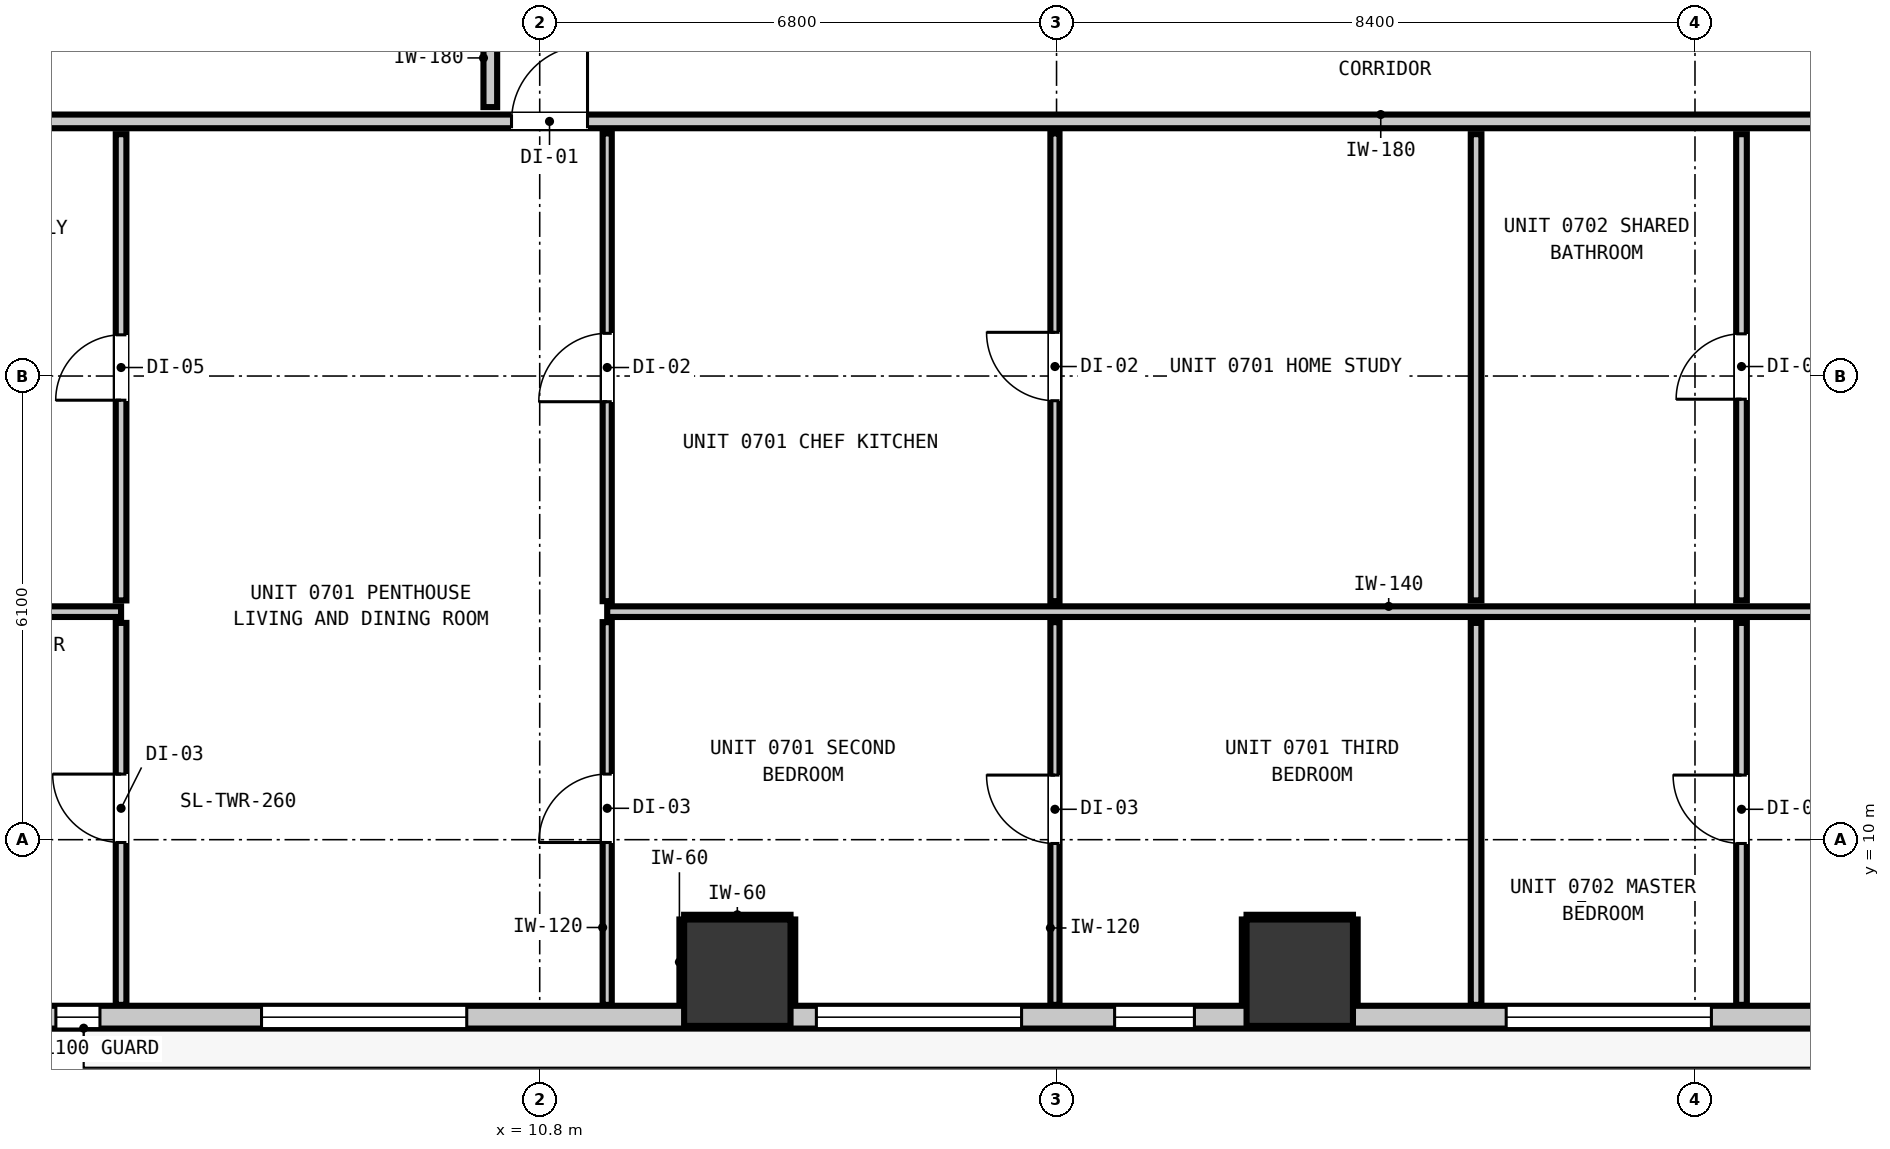
"""IFC4 building model, lengths in metres.
Left out: names, types, materials, properties, quantities, classifications, styles, units other than length and angle.
Written with IfcOpenShell. Run it as: python <this file> out.ifc"""

import sys

from ifc_helpers import new_model, si_unit, direction, frame, frame_2d, origin, origin_2d, place, context, subcontext, project, spatial, rectangle, extrude, element, fill, save


model = new_model("IFC4")
c1 = context("Model", 3, precision=1e-05, world=origin(), true_north=direction((0.0, 1.0)))
c2 = subcontext(c1, "Body", "Model", "MODEL_VIEW")
j1 = project(units=[si_unit("LENGTHUNIT", "METRE"), si_unit("PLANEANGLEUNIT", "RADIAN")], contexts=[c1])
p1 = place(None, origin())
s1 = spatial("IfcSite", under=j1, at=p1, CompositionType="ELEMENT")
p2 = place(p1, origin())
s2 = spatial("IfcBuilding", under=s1, at=p2, CompositionType="ELEMENT")
p3 = place(p2, frame((0.0, 0.0, 28.64)))
s3 = spatial("IfcBuildingStorey", under=s2, at=p3, CompositionType="ELEMENT", Elevation=28.64)
for number, where, z_axis, x_axis in (
    (1, (13.4, 8.25, 0.0), (0.0, 0.0, 1.0), (1.0, 0.0, 0.0)),
    (2, (20.8, 8.25, 0.0), (0.0, 0.0, 1.0), (1.0, 0.0, 0.0)),
):
    element("IfcColumn", number, at=place(p3, frame(where, z_axis=z_axis, x_axis=x_axis)), inside=s3, PredefinedType="COLUMN", context=c2, shape_type="SweptSolid", body=[
        extrude(rectangle(XDim=1.4, YDim=1.4, at=origin_2d()), origin(), (0.0, 0.0, 1.0), 3.32),
    ])
p4 = place(p3, frame((41.635, 7.665, 0.0), z_axis=(0.0, 0.0, 1.0), x_axis=(-1.0, 0.0, 0.0)))
e3 = element("IfcWall", 3, at=p4, inside=s3, PredefinedType="STANDARD", context=c2, shape_type="SweptSolid", body=[
    extrude(rectangle(XDim=37.47, YDim=0.3, at=frame_2d((18.735, 0.0))), origin(), (0.0, 0.0, 1.0), 3.06),
])
p5 = place(p4, frame((0.901, 0.0, 0.0)))
e4 = element("IfcOpeningElement", 4, at=p5, cuts=e3, PredefinedType="OPENING", context=c2, shape_type="SweptSolid", body=[
    extrude(rectangle(XDim=1.0, YDim=2.15, at=frame_2d((0.5, 1.075))), frame((0.0, 0.16, 0.0), z_axis=(0.0, -1.0, 0.0), x_axis=(1.0, 0.0, 0.0)), (0.0, 0.0, 1.0), 0.32),
])
p6 = place(p4, frame((31.795, 0.0, 0.85)))
e5 = element("IfcOpeningElement", 5, at=p6, cuts=e3, PredefinedType="OPENING", context=c2, shape_type="SweptSolid", body=[
    extrude(rectangle(XDim=2.7, YDim=2.0, at=frame_2d((1.35, 1.0))), frame((0.0, 0.16, 0.0), z_axis=(0.0, -1.0, 0.0), x_axis=(1.0, 0.0, 0.0)), (0.0, 0.0, 1.0), 0.32),
])
p7 = place(p4, frame((36.621, 0.0, 0.85)))
e6 = element("IfcOpeningElement", 6, at=p7, cuts=e3, PredefinedType="OPENING", context=c2, shape_type="SweptSolid", body=[
    extrude(rectangle(XDim=0.58, YDim=1.5, at=frame_2d((0.29, 0.75))), frame((0.0, 0.16, 0.0), z_axis=(0.0, -1.0, 0.0), x_axis=(1.0, 0.0, 0.0)), (0.0, 0.0, 1.0), 0.32),
])
p8 = place(p4, frame((24.495, 0.0, 0.85)))
e7 = element("IfcOpeningElement", 7, at=p8, cuts=e3, PredefinedType="OPENING", context=c2, shape_type="SweptSolid", body=[
    extrude(rectangle(XDim=2.7, YDim=2.0, at=frame_2d((1.35, 1.0))), frame((0.0, 0.16, 0.0), z_axis=(0.0, -1.0, 0.0), x_axis=(1.0, 0.0, 0.0)), (0.0, 0.0, 1.0), 0.32),
])
p9 = place(p4, frame((22.221, 0.0, 0.85)))
e8 = element("IfcOpeningElement", 8, at=p9, cuts=e3, PredefinedType="OPENING", context=c2, shape_type="SweptSolid", body=[
    extrude(rectangle(XDim=1.05, YDim=1.65, at=frame_2d((0.525, 0.825))), frame((0.0, 0.16, 0.0), z_axis=(0.0, -1.0, 0.0), x_axis=(1.0, 0.0, 0.0)), (0.0, 0.0, 1.0), 0.32),
])
p10 = place(p4, frame((7.435, 0.0, 0.85)))
e9 = element("IfcOpeningElement", 9, at=p10, cuts=e3, PredefinedType="OPENING", context=c2, shape_type="SweptSolid", body=[
    extrude(rectangle(XDim=2.7, YDim=2.0, at=frame_2d((1.35, 1.0))), frame((0.0, 0.16, 0.0), z_axis=(0.0, -1.0, 0.0), x_axis=(1.0, 0.0, 0.0)), (0.0, 0.0, 1.0), 0.32),
])
p11 = place(p4, frame((15.419, 0.0, 0.85)))
e10 = element("IfcOpeningElement", 10, at=p11, cuts=e3, PredefinedType="OPENING", context=c2, shape_type="SweptSolid", body=[
    extrude(rectangle(XDim=2.7, YDim=2.0, at=frame_2d((1.35, 1.0))), frame((0.0, 0.16, 0.0), z_axis=(0.0, -1.0, 0.0), x_axis=(1.0, 0.0, 0.0)), (0.0, 0.0, 1.0), 0.32),
])
p12 = place(p3, frame((1.827, 19.45, 0.0), z_axis=(0.0, 0.0, 1.0), x_axis=(1.0, 0.0, 0.0)))
e11 = element("IfcWall", 11, at=p12, inside=s3, PredefinedType="PARTITIONING", context=c2, shape_type="SweptSolid", body=[
    extrude(rectangle(XDim=42.146, YDim=0.18, at=frame_2d((21.073, 0.0))), origin(), (0.0, 0.0, 1.0), 3.06),
])
p13 = place(p12, frame((8.602, 0.0, 0.0)))
e12 = element("IfcOpeningElement", 12, at=p13, cuts=e11, PredefinedType="OPENING", context=c2, shape_type="SweptSolid", body=[
    extrude(rectangle(XDim=1.0, YDim=2.15, at=frame_2d((0.5, 1.075))), frame((0.0, 0.1, 0.0), z_axis=(0.0, -1.0, 0.0), x_axis=(1.0, 0.0, 0.0)), (0.0, 0.0, 1.0), 0.2),
])
p14 = place(p12, frame((30.475, 0.0, 0.0)))
e13 = element("IfcOpeningElement", 13, at=p14, cuts=e11, PredefinedType="OPENING", context=c2, shape_type="SweptSolid", body=[
    extrude(rectangle(XDim=1.0, YDim=2.15, at=frame_2d((0.5, 1.075))), frame((0.0, 0.1, 0.0), z_axis=(0.0, -1.0, 0.0), x_axis=(1.0, 0.0, 0.0)), (0.0, 0.0, 1.0), 0.2),
])
p15 = place(p3, frame((1.827, 13.0, 0.0), z_axis=(0.0, 0.0, 1.0), x_axis=(1.0, 0.0, 0.0)))
e14 = element("IfcWall", 14, at=p15, inside=s3, PredefinedType="PARTITIONING", context=c2, shape_type="SweptSolid", body=[
    extrude(rectangle(XDim=3.465, YDim=0.14, at=frame_2d((1.732, 0.0))), origin(), (0.0, 0.0, 1.0), 3.06),
])
p16 = place(p3, frame((11.688, 13.0, 0.0), z_axis=(0.0, 0.0, 1.0), x_axis=(1.0, 0.0, 0.0)))
e15 = element("IfcWall", 15, at=p16, inside=s3, PredefinedType="PARTITIONING", context=c2, shape_type="SweptSolid", body=[
    extrude(rectangle(XDim=32.285, YDim=0.14, at=frame_2d((16.143, 0.0))), origin(), (0.0, 0.0, 1.0), 3.06),
])
p17 = place(p16, frame((20.664, 0.0, 0.0)))
e16 = element("IfcOpeningElement", 16, at=p17, cuts=e15, PredefinedType="OPENING", context=c2, shape_type="SweptSolid", body=[
    extrude(rectangle(XDim=0.9, YDim=2.1, at=frame_2d((0.45, 1.05))), frame((0.0, 0.08, 0.0), z_axis=(0.0, -1.0, 0.0), x_axis=(1.0, 0.0, 0.0)), (0.0, 0.0, 1.0), 0.16),
])
p18 = place(p3, frame((10.15, 19.638, 0.0), z_axis=(0.0, 0.0, 1.0), x_axis=(0.0, 1.0, 0.0)))
e17 = element("IfcWall", 17, at=p18, inside=s3, PredefinedType="PARTITIONING", context=c2, shape_type="SweptSolid", body=[
    extrude(rectangle(XDim=1.294, YDim=0.18, at=frame_2d((0.647, 0.0))), origin(), (0.0, 0.0, 1.0), 3.06),
])
p19 = place(p3, frame((5.292, 7.827, 0.0), z_axis=(0.0, 0.0, 1.0), x_axis=(0.0, 1.0, 0.0)))
e18 = element("IfcWall", 18, at=p19, inside=s3, PredefinedType="PARTITIONING", context=c2, shape_type="SweptSolid", body=[
    extrude(rectangle(XDim=5.025, YDim=0.14, at=frame_2d((2.513, 0.0))), origin(), (0.0, 0.0, 1.0), 3.06),
])
p20 = place(p19, frame((2.136, 0.0, 0.0)))
e19 = element("IfcOpeningElement", 19, at=p20, cuts=e18, PredefinedType="OPENING", context=c2, shape_type="SweptSolid", body=[
    extrude(rectangle(XDim=0.9, YDim=2.1, at=frame_2d((0.45, 1.05))), frame((0.0, 0.08, 0.0), z_axis=(0.0, -1.0, 0.0), x_axis=(1.0, 0.0, 0.0)), (0.0, 0.0, 1.0), 0.16),
])
p21 = place(p3, frame((5.292, 13.148, 0.0), z_axis=(0.0, 0.0, 1.0), x_axis=(0.0, 1.0, 0.0)))
e20 = element("IfcWall", 20, at=p21, inside=s3, PredefinedType="PARTITIONING", context=c2, shape_type="SweptSolid", body=[
    extrude(rectangle(XDim=6.134, YDim=0.14, at=frame_2d((3.067, 0.0))), origin(), (0.0, 0.0, 1.0), 3.06),
])
p22 = place(p21, frame((2.634, 0.0, 0.0)))
e21 = element("IfcOpeningElement", 21, at=p22, cuts=e20, PredefinedType="OPENING", context=c2, shape_type="SweptSolid", body=[
    extrude(rectangle(XDim=0.86, YDim=2.02, at=frame_2d((0.43, 1.01))), frame((0.0, 0.08, 0.0), z_axis=(0.0, -1.0, 0.0), x_axis=(1.0, 0.0, 0.0)), (0.0, 0.0, 1.0), 0.16),
])
p23 = place(p3, frame((23.12, 7.827, 0.0), z_axis=(0.0, 0.0, 1.0), x_axis=(0.0, 1.0, 0.0)))
e22 = element("IfcWall", 22, at=p23, inside=s3, PredefinedType="PARTITIONING", context=c2, shape_type="SweptSolid", body=[
    extrude(rectangle(XDim=5.025, YDim=0.14, at=frame_2d((2.513, 0.0))), origin(), (0.0, 0.0, 1.0), 3.06),
])
p24 = place(p3, frame((23.12, 13.148, 0.0), z_axis=(0.0, 0.0, 1.0), x_axis=(0.0, 1.0, 0.0)))
e23 = element("IfcWall", 23, at=p24, inside=s3, PredefinedType="PARTITIONING", context=c2, shape_type="SweptSolid", body=[
    extrude(rectangle(XDim=6.134, YDim=0.14, at=frame_2d((3.067, 0.0))), origin(), (0.0, 0.0, 1.0), 3.06),
])
p25 = place(p3, frame((26.612, 7.827, 0.0), z_axis=(0.0, 0.0, 1.0), x_axis=(0.0, 1.0, 0.0)))
e24 = element("IfcWall", 24, at=p25, inside=s3, PredefinedType="PARTITIONING", context=c2, shape_type="SweptSolid", body=[
    extrude(rectangle(XDim=5.025, YDim=0.14, at=frame_2d((2.513, 0.0))), origin(), (0.0, 0.0, 1.0), 3.06),
])
p26 = place(p25, frame((2.123, 0.0, 0.0)))
e25 = element("IfcOpeningElement", 25, at=p26, cuts=e24, PredefinedType="OPENING", context=c2, shape_type="SweptSolid", body=[
    extrude(rectangle(XDim=0.9, YDim=2.1, at=frame_2d((0.45, 1.05))), frame((0.0, 0.08, 0.0), z_axis=(0.0, -1.0, 0.0), x_axis=(1.0, 0.0, 0.0)), (0.0, 0.0, 1.0), 0.16),
])
p27 = place(p3, frame((26.612, 13.148, 0.0), z_axis=(0.0, 0.0, 1.0), x_axis=(0.0, 1.0, 0.0)))
e26 = element("IfcWall", 26, at=p27, inside=s3, PredefinedType="PARTITIONING", context=c2, shape_type="SweptSolid", body=[
    extrude(rectangle(XDim=6.134, YDim=0.14, at=frame_2d((3.067, 0.0))), origin(), (0.0, 0.0, 1.0), 3.06),
])
p28 = place(p27, frame((2.647, 0.0, 0.0)))
e27 = element("IfcOpeningElement", 27, at=p28, cuts=e26, PredefinedType="OPENING", context=c2, shape_type="SweptSolid", body=[
    extrude(rectangle(XDim=0.86, YDim=2.02, at=frame_2d((0.43, 1.01))), frame((0.0, 0.08, 0.0), z_axis=(0.0, -1.0, 0.0), x_axis=(1.0, 0.0, 0.0)), (0.0, 0.0, 1.0), 0.16),
])
p29 = place(p3, frame((11.688, 7.827, 0.0), z_axis=(0.0, 0.0, 1.0), x_axis=(0.0, 1.0, 0.0)))
e28 = element("IfcWall", 28, at=p29, inside=s3, PredefinedType="PARTITIONING", context=c2, shape_type="SweptSolid", body=[
    extrude(rectangle(XDim=5.035, YDim=0.12, at=frame_2d((2.518, 0.0))), origin(), (0.0, 0.0, 1.0), 3.06),
])
p30 = place(p29, frame((2.136, 0.0, 0.0)))
e29 = element("IfcOpeningElement", 29, at=p30, cuts=e28, PredefinedType="OPENING", context=c2, shape_type="SweptSolid", body=[
    extrude(rectangle(XDim=0.9, YDim=2.1, at=frame_2d((0.45, 1.05))), frame((0.0, 0.07, 0.0), z_axis=(0.0, -1.0, 0.0), x_axis=(1.0, 0.0, 0.0)), (0.0, 0.0, 1.0), 0.14),
])
p31 = place(p3, frame((11.688, 13.138, 0.0), z_axis=(0.0, 0.0, 1.0), x_axis=(0.0, 1.0, 0.0)))
e30 = element("IfcWall", 30, at=p31, inside=s3, PredefinedType="PARTITIONING", context=c2, shape_type="SweptSolid", body=[
    extrude(rectangle(XDim=6.154, YDim=0.12, at=frame_2d((3.077, 0.0))), origin(), (0.0, 0.0, 1.0), 3.06),
])
p32 = place(p31, frame((2.624, 0.0, 0.0)))
e31 = element("IfcOpeningElement", 31, at=p32, cuts=e30, PredefinedType="OPENING", context=c2, shape_type="SweptSolid", body=[
    extrude(rectangle(XDim=0.9, YDim=2.1, at=frame_2d((0.45, 1.05))), frame((0.0, 0.07, 0.0), z_axis=(0.0, -1.0, 0.0), x_axis=(1.0, 0.0, 0.0)), (0.0, 0.0, 1.0), 0.14),
])
p33 = place(p3, frame((17.579, 7.827, 0.0), z_axis=(0.0, 0.0, 1.0), x_axis=(0.0, 1.0, 0.0)))
e32 = element("IfcWall", 32, at=p33, inside=s3, PredefinedType="PARTITIONING", context=c2, shape_type="SweptSolid", body=[
    extrude(rectangle(XDim=5.035, YDim=0.12, at=frame_2d((2.518, 0.0))), origin(), (0.0, 0.0, 1.0), 3.06),
])
p34 = place(p33, frame((2.123, 0.0, 0.0)))
e33 = element("IfcOpeningElement", 33, at=p34, cuts=e32, PredefinedType="OPENING", context=c2, shape_type="SweptSolid", body=[
    extrude(rectangle(XDim=0.9, YDim=2.1, at=frame_2d((0.45, 1.05))), frame((0.0, 0.07, 0.0), z_axis=(0.0, -1.0, 0.0), x_axis=(1.0, 0.0, 0.0)), (0.0, 0.0, 1.0), 0.14),
])
p35 = place(p3, frame((17.579, 13.138, 0.0), z_axis=(0.0, 0.0, 1.0), x_axis=(0.0, 1.0, 0.0)))
e34 = element("IfcWall", 34, at=p35, inside=s3, PredefinedType="PARTITIONING", context=c2, shape_type="SweptSolid", body=[
    extrude(rectangle(XDim=6.154, YDim=0.12, at=frame_2d((3.077, 0.0))), origin(), (0.0, 0.0, 1.0), 3.06),
])
p36 = place(p35, frame((2.637, 0.0, 0.0)))
e35 = element("IfcOpeningElement", 35, at=p36, cuts=e34, PredefinedType="OPENING", context=c2, shape_type="SweptSolid", body=[
    extrude(rectangle(XDim=0.9, YDim=2.1, at=frame_2d((0.45, 1.05))), frame((0.0, 0.07, 0.0), z_axis=(0.0, -1.0, 0.0), x_axis=(1.0, 0.0, 0.0)), (0.0, 0.0, 1.0), 0.14),
])
p37 = place(p3, frame((12.7, 8.982, 0.0), z_axis=(0.0, 0.0, 1.0), x_axis=(1.0, 0.0, 0.0)))
e36 = element("IfcWall", 36, at=p37, inside=s3, PredefinedType="PARTITIONING", context=c2, shape_type="SweptSolid", body=[
    extrude(rectangle(XDim=1.4, YDim=0.06, at=frame_2d((0.7, 0.0))), origin(), (0.0, 0.0, 1.0), 1.45),
])
for number, where, z_axis, x_axis in (
    (37, (12.668, 7.83, 0.0), (0.0, 0.0, 1.0), (0.0, 1.0, 0.0)),
    (38, (14.132, 7.83, 0.0), (0.0, 0.0, 1.0), (0.0, 1.0, 0.0)),
):
    element("IfcWall", number, at=place(p3, frame(where, z_axis=z_axis, x_axis=x_axis)), inside=s3, PredefinedType="PARTITIONING", context=c2, shape_type="SweptSolid", body=[
        extrude(rectangle(XDim=1.12, YDim=0.06, at=frame_2d((0.56, 0.0))), origin(), (0.0, 0.0, 1.0), 1.45),
    ])
p38 = place(p3, frame((20.1, 8.982, 0.0), z_axis=(0.0, 0.0, 1.0), x_axis=(1.0, 0.0, 0.0)))
e39 = element("IfcWall", 39, at=p38, inside=s3, PredefinedType="PARTITIONING", context=c2, shape_type="SweptSolid", body=[
    extrude(rectangle(XDim=1.4, YDim=0.06, at=frame_2d((0.7, 0.0))), origin(), (0.0, 0.0, 1.0), 1.45),
])
for number, where, z_axis, x_axis in (
    (40, (20.068, 7.83, 0.0), (0.0, 0.0, 1.0), (0.0, 1.0, 0.0)),
    (41, (21.532, 7.83, 0.0), (0.0, 0.0, 1.0), (0.0, 1.0, 0.0)),
):
    element("IfcWall", number, at=place(p3, frame(where, z_axis=z_axis, x_axis=x_axis)), inside=s3, PredefinedType="PARTITIONING", context=c2, shape_type="SweptSolid", body=[
        extrude(rectangle(XDim=1.12, YDim=0.06, at=frame_2d((0.56, 0.0))), origin(), (0.0, 0.0, 1.0), 1.45),
    ])
p39 = place(p6, origin())
e42 = element("IfcWindow", 42, at=p39, inside=s3, PartitioningType="SINGLE_PANEL", PredefinedType="WINDOW", context=c2, shape_type="SweptSolid", body=[
    extrude(rectangle(XDim=2.7, YDim=2.0, at=frame_2d((1.35, 1.0))), frame((0.0, 0.03, 0.0), z_axis=(0.0, -1.0, 0.0), x_axis=(1.0, 0.0, 0.0)), (0.0, 0.0, 1.0), 0.06),
])
fill(e5, e42)
p40 = place(p7, origin())
e43 = element("IfcWindow", 43, at=p40, inside=s3, PartitioningType="SINGLE_PANEL", PredefinedType="WINDOW", context=c2, shape_type="SweptSolid", body=[
    extrude(rectangle(XDim=0.58, YDim=1.5, at=frame_2d((0.29, 0.75))), frame((0.0, 0.03, 0.0), z_axis=(0.0, -1.0, 0.0), x_axis=(1.0, 0.0, 0.0)), (0.0, 0.0, 1.0), 0.06),
])
fill(e6, e43)
p41 = place(p8, origin())
e44 = element("IfcWindow", 44, at=p41, inside=s3, PartitioningType="SINGLE_PANEL", PredefinedType="WINDOW", context=c2, shape_type="SweptSolid", body=[
    extrude(rectangle(XDim=2.7, YDim=2.0, at=frame_2d((1.35, 1.0))), frame((0.0, 0.03, 0.0), z_axis=(0.0, -1.0, 0.0), x_axis=(1.0, 0.0, 0.0)), (0.0, 0.0, 1.0), 0.06),
])
fill(e7, e44)
p42 = place(p9, origin())
e45 = element("IfcWindow", 45, at=p42, inside=s3, PartitioningType="SINGLE_PANEL", PredefinedType="WINDOW", context=c2, shape_type="SweptSolid", body=[
    extrude(rectangle(XDim=1.05, YDim=1.65, at=frame_2d((0.525, 0.825))), frame((0.0, 0.03, 0.0), z_axis=(0.0, -1.0, 0.0), x_axis=(1.0, 0.0, 0.0)), (0.0, 0.0, 1.0), 0.06),
])
fill(e8, e45)
p43 = place(p11, origin())
e46 = element("IfcWindow", 46, at=p43, inside=s3, PartitioningType="SINGLE_PANEL", PredefinedType="WINDOW", context=c2, shape_type="SweptSolid", body=[
    extrude(rectangle(XDim=2.7, YDim=2.0, at=frame_2d((1.35, 1.0))), frame((0.0, 0.03, 0.0), z_axis=(0.0, -1.0, 0.0), x_axis=(1.0, 0.0, 0.0)), (0.0, 0.0, 1.0), 0.06),
])
fill(e10, e46)
p44 = place(p13, origin())
e47 = element("IfcDoor", 47, at=p44, inside=s3, OperationType="SINGLE_SWING_RIGHT", PredefinedType="DOOR", context=c2, shape_type="SweptSolid", body=[
    extrude(rectangle(XDim=1.0, YDim=2.15, at=frame_2d((0.5, 1.075))), frame((0.0, 0.025, 0.0), z_axis=(0.0, -1.0, 0.0), x_axis=(1.0, 0.0, 0.0)), (0.0, 0.0, 1.0), 0.05),
])
fill(e12, e47)
p45 = place(p22, origin())
e48 = element("IfcDoor", 48, at=p45, inside=s3, OperationType="SINGLE_SWING_LEFT", PredefinedType="DOOR", context=c2, shape_type="SweptSolid", body=[
    extrude(rectangle(XDim=0.86, YDim=2.02, at=frame_2d((0.43, 1.01))), frame((0.0, 0.025, 0.0), z_axis=(0.0, -1.0, 0.0), x_axis=(1.0, 0.0, 0.0)), (0.0, 0.0, 1.0), 0.05),
])
fill(e21, e48)
p46 = place(p20, origin())
e49 = element("IfcDoor", 49, at=p46, inside=s3, OperationType="SINGLE_SWING_RIGHT", PredefinedType="DOOR", context=c2, shape_type="SweptSolid", body=[
    extrude(rectangle(XDim=0.9, YDim=2.1, at=frame_2d((0.45, 1.05))), frame((0.0, 0.025, 0.0), z_axis=(0.0, -1.0, 0.0), x_axis=(1.0, 0.0, 0.0)), (0.0, 0.0, 1.0), 0.05),
])
fill(e19, e49)
p47 = place(p32, origin())
e50 = element("IfcDoor", 50, at=p47, inside=s3, OperationType="SINGLE_SWING_LEFT", PredefinedType="DOOR", context=c2, shape_type="SweptSolid", body=[
    extrude(rectangle(XDim=0.9, YDim=2.1, at=frame_2d((0.45, 1.05))), frame((0.0, 0.025, 0.0), z_axis=(0.0, -1.0, 0.0), x_axis=(1.0, 0.0, 0.0)), (0.0, 0.0, 1.0), 0.05),
])
fill(e31, e50)
p48 = place(p36, origin())
e51 = element("IfcDoor", 51, at=p48, inside=s3, OperationType="SINGLE_SWING_RIGHT", PredefinedType="DOOR", context=c2, shape_type="SweptSolid", body=[
    extrude(rectangle(XDim=0.9, YDim=2.1, at=frame_2d((0.45, 1.05))), frame((0.0, 0.025, 0.0), z_axis=(0.0, -1.0, 0.0), x_axis=(1.0, 0.0, 0.0)), (0.0, 0.0, 1.0), 0.05),
])
fill(e35, e51)
p49 = place(p30, origin())
e52 = element("IfcDoor", 52, at=p49, inside=s3, OperationType="SINGLE_SWING_LEFT", PredefinedType="DOOR", context=c2, shape_type="SweptSolid", body=[
    extrude(rectangle(XDim=0.9, YDim=2.1, at=frame_2d((0.45, 1.05))), frame((0.0, 0.025, 0.0), z_axis=(0.0, -1.0, 0.0), x_axis=(1.0, 0.0, 0.0)), (0.0, 0.0, 1.0), 0.05),
])
fill(e29, e52)
p50 = place(p34, origin())
e53 = element("IfcDoor", 53, at=p50, inside=s3, OperationType="SINGLE_SWING_RIGHT", PredefinedType="DOOR", context=c2, shape_type="SweptSolid", body=[
    extrude(rectangle(XDim=0.9, YDim=2.1, at=frame_2d((0.45, 1.05))), frame((0.0, 0.025, 0.0), z_axis=(0.0, -1.0, 0.0), x_axis=(1.0, 0.0, 0.0)), (0.0, 0.0, 1.0), 0.05),
])
fill(e33, e53)
p51 = place(p28, origin())
e54 = element("IfcDoor", 54, at=p51, inside=s3, OperationType="SINGLE_SWING_LEFT", PredefinedType="DOOR", context=c2, shape_type="SweptSolid", body=[
    extrude(rectangle(XDim=0.86, YDim=2.02, at=frame_2d((0.43, 1.01))), frame((0.0, 0.025, 0.0), z_axis=(0.0, -1.0, 0.0), x_axis=(1.0, 0.0, 0.0)), (0.0, 0.0, 1.0), 0.05),
])
fill(e27, e54)
p52 = place(p26, origin())
e55 = element("IfcDoor", 55, at=p52, inside=s3, OperationType="SINGLE_SWING_RIGHT", PredefinedType="DOOR", context=c2, shape_type="SweptSolid", body=[
    extrude(rectangle(XDim=0.9, YDim=2.1, at=frame_2d((0.45, 1.05))), frame((0.0, 0.025, 0.0), z_axis=(0.0, -1.0, 0.0), x_axis=(1.0, 0.0, 0.0)), (0.0, 0.0, 1.0), 0.05),
])
fill(e25, e55)
save(model, sys.argv[1])
